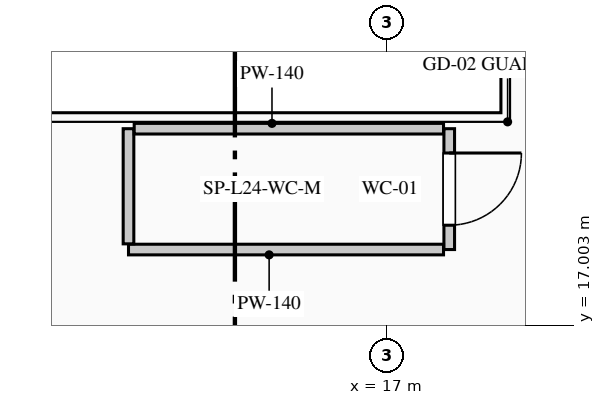
"""IFC4 building model, lengths in metres.
Left out: names, types, materials, properties, quantities, classifications, styles, units other than length and angle.
Written with IfcOpenShell. Run it as: python <this file> out.ifc"""

import sys

from ifc_helpers import new_model, si_unit, direction, frame, frame_2d, origin, place, context, subcontext, project, spatial, rectangle, extrude, element, fill, save


model = new_model("IFC4")
c1 = context("Model", 3, precision=1e-05, world=origin(), true_north=direction((0.0, 1.0)))
c2 = subcontext(c1, "Body", "Model", "MODEL_VIEW")
j1 = project(units=[si_unit("LENGTHUNIT", "METRE"), si_unit("PLANEANGLEUNIT", "RADIAN")], contexts=[c1])
p1 = place(None, origin())
s1 = spatial("IfcSite", under=j1, at=p1, CompositionType="ELEMENT")
p2 = place(p1, origin())
s2 = spatial("IfcBuilding", under=s1, at=p2, CompositionType="ELEMENT")
p3 = place(p2, frame((0.0, 0.0, 106.2)))
s3 = spatial("IfcBuildingStorey", under=s2, at=p3, CompositionType="ELEMENT", Elevation=106.2)
p4 = place(p3, frame((17.82, 19.59, 0.0), z_axis=(0.0, 0.0, 1.0), x_axis=(0.0, -1.0, 0.0)))
e1 = element("IfcWall", 1, at=p4, inside=s3, PredefinedType="PARTITIONING", context=c2, shape_type="SweptSolid", body=[
    extrude(rectangle(XDim=1.59, YDim=0.14, at=frame_2d((0.795, 0.0))), origin(), (0.0, 0.0, 1.0), 4.94),
])
p5 = place(p4, frame((0.32, 0.0, 0.0)))
e2 = element("IfcOpeningElement", 2, at=p5, cuts=e1, PredefinedType="OPENING", context=c2, shape_type="SweptSolid", body=[
    extrude(rectangle(XDim=0.95, YDim=2.15, at=frame_2d((0.475, 1.075))), frame((0.0, 0.08, 0.0), z_axis=(0.0, -1.0, 0.0), x_axis=(1.0, 0.0, 0.0)), (0.0, 0.0, 1.0), 0.16),
])
p6 = place(p3, frame((17.745, 18.0, 0.0), z_axis=(0.0, 0.0, 1.0), x_axis=(-1.0, 0.0, 0.0)))
e3 = element("IfcWall", 3, at=p6, inside=s3, PredefinedType="PARTITIONING", context=c2, shape_type="SweptSolid", body=[
    extrude(rectangle(XDim=4.145, YDim=0.14, at=frame_2d((2.073, 0.0))), origin(), (0.0, 0.0, 1.0), 4.94),
])
p7 = place(p3, frame((13.6, 18.075, 0.0), z_axis=(0.0, 0.0, 1.0), x_axis=(0.0, 1.0, 0.0)))
e4 = element("IfcWall", 4, at=p7, inside=s3, PredefinedType="PARTITIONING", context=c2, shape_type="SweptSolid", body=[
    extrude(rectangle(XDim=1.515, YDim=0.14, at=frame_2d((0.758, 0.0))), origin(), (0.0, 0.0, 1.0), 4.94),
])
p8 = place(p3, frame((13.675, 19.59, 0.0), z_axis=(0.0, 0.0, 1.0), x_axis=(1.0, 0.0, 0.0)))
e5 = element("IfcWall", 5, at=p8, inside=s3, PredefinedType="PARTITIONING", context=c2, shape_type="SweptSolid", body=[
    extrude(rectangle(XDim=4.07, YDim=0.14, at=frame_2d((2.035, 0.0))), origin(), (0.0, 0.0, 1.0), 4.94),
])
p9 = place(p5, origin())
e6 = element("IfcDoor", 6, at=p9, inside=s3, OperationType="SINGLE_SWING_LEFT", PredefinedType="DOOR", context=c2, shape_type="SweptSolid", body=[
    extrude(rectangle(XDim=0.95, YDim=2.15, at=frame_2d((0.475, 1.075))), frame((0.0, 0.025, 0.0), z_axis=(0.0, -1.0, 0.0), x_axis=(1.0, 0.0, 0.0)), (0.0, 0.0, 1.0), 0.05),
])
fill(e2, e6)
save(model, sys.argv[1])
